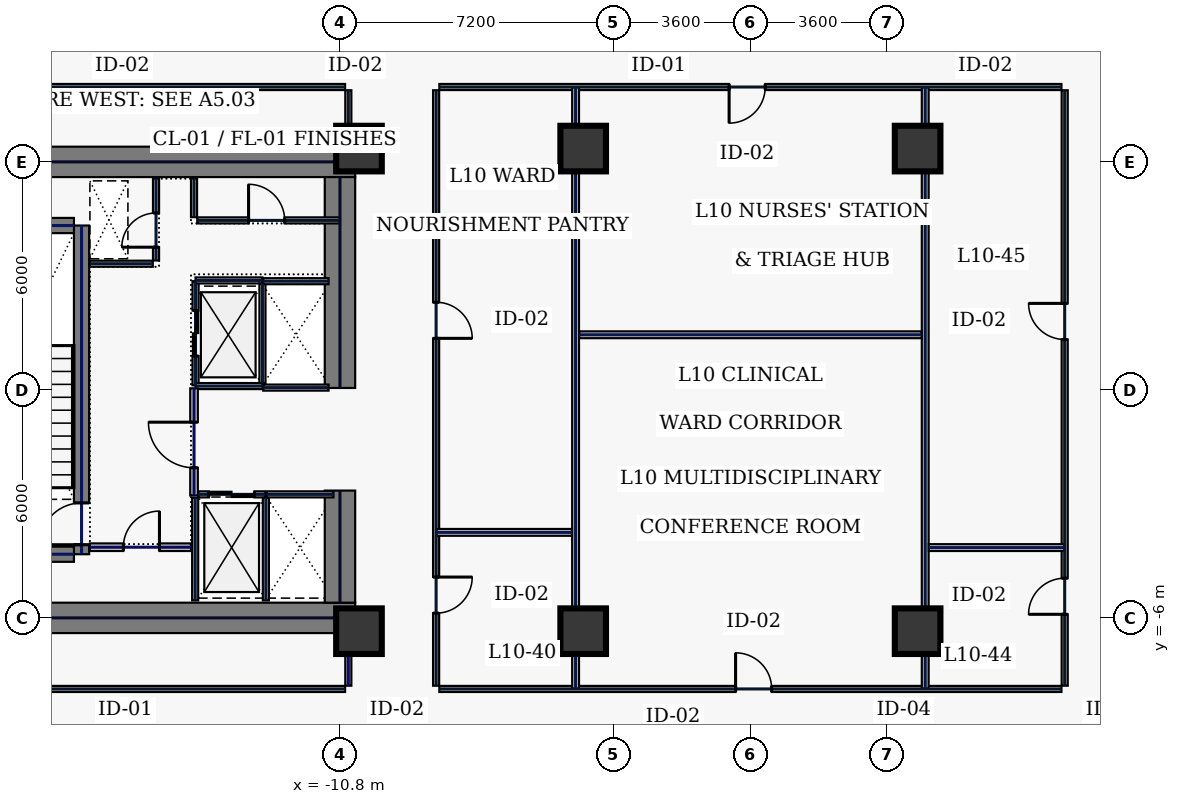
"""IFC4 building model, lengths in metres.
Left out: names, types, materials, properties, quantities, classifications, styles, units other than length and angle.
Written with IfcOpenShell. Run it as: python <this file> out.ifc"""

import sys

from ifc_helpers import new_model, si_unit, direction, frame, frame_2d, origin, origin_2d, place, context, subcontext, project, spatial, rectangle, hollow_rectangle, extrude, element, fill, save


model = new_model("IFC4")
c1 = context("Model", 3, precision=1e-05, world=origin(), true_north=direction((0.0, 1.0)))
c2 = subcontext(c1, "Body", "Model", "MODEL_VIEW")
j1 = project(units=[si_unit("LENGTHUNIT", "METRE"), si_unit("PLANEANGLEUNIT", "RADIAN")], contexts=[c1])
p1 = place(None, origin())
s1 = spatial("IfcSite", under=j1, at=p1, CompositionType="ELEMENT")
p2 = place(p1, origin())
s2 = spatial("IfcBuilding", under=s1, at=p2, CompositionType="ELEMENT")
p3 = place(p2, frame((0.0, 0.0, 51.4)))
s3 = spatial("IfcBuildingStorey", under=s2, at=p3, CompositionType="ELEMENT", Elevation=51.4)
for number, where, z_axis, x_axis in (
    (1, (-22.0, 6.0, 0.0), (0.0, 0.0, 1.0), (1.0, 0.0, 0.0)),
    (2, (-22.0, -6.0, 0.0), (0.0, 0.0, 1.0), (1.0, 0.0, 0.0)),
):
    element("IfcWall", number, at=place(p3, frame(where, z_axis=z_axis, x_axis=x_axis)), inside=s3, PredefinedType="SHEAR", context=c2, shape_type="SweptSolid", body=[
        extrude(rectangle(XDim=11.6, YDim=0.8, at=frame_2d((5.8, 0.0))), origin(), (0.0, 0.0, 1.0), 3.74),
    ])
p4 = place(p3, frame((-10.8, -5.6, 0.0), z_axis=(0.0, 0.0, 1.0), x_axis=(0.0, 1.0, 0.0)))
e3 = element("IfcWall", 3, at=p4, inside=s3, PredefinedType="SHEAR", context=c2, shape_type="SweptSolid", body=[
    extrude(rectangle(XDim=2.95, YDim=0.8, at=frame_2d((1.475, 0.0))), origin(), (0.0, 0.0, 1.0), 3.74),
])
p5 = place(p3, frame((-10.8, 0.05, 0.0), z_axis=(0.0, 0.0, 1.0), x_axis=(0.0, 1.0, 0.0)))
e4 = element("IfcWall", 4, at=p5, inside=s3, PredefinedType="SHEAR", context=c2, shape_type="SweptSolid", body=[
    extrude(rectangle(XDim=5.55, YDim=0.8, at=frame_2d((2.775, 0.0))), origin(), (0.0, 0.0, 1.0), 3.74),
])
p6 = place(p3, frame((-17.6, -4.325, 0.0), z_axis=(0.0, 0.0, 1.0), x_axis=(0.0, 1.0, 0.0)))
e5 = element("IfcWall", 5, at=p6, inside=s3, PredefinedType="SHEAR", context=c2, shape_type="SweptSolid", body=[
    extrude(rectangle(XDim=8.65, YDim=0.4, at=frame_2d((4.325, 0.0))), origin(), (0.0, 0.0, 1.0), 3.74),
])
p7 = place(p6, frame((0.25, 0.0, 0.0)))
e6 = element("IfcOpeningElement", 6, at=p7, cuts=e5, PredefinedType="OPENING", context=c2, shape_type="SweptSolid", body=[
    extrude(rectangle(XDim=1.1, YDim=2.2, at=frame_2d((0.55, 1.1))), frame((0.0, 0.21, 0.0), z_axis=(0.0, -1.0, 0.0), x_axis=(1.0, 0.0, 0.0)), (0.0, 0.0, 1.0), 0.42),
])
for number, where, z_axis, x_axis in (
    (7, (-21.2, -4.325, 0.0), (0.0, 0.0, 1.0), (1.0, 0.0, 0.0)),
    (8, (-21.2, 4.325, 0.0), (0.0, 0.0, 1.0), (1.0, 0.0, 0.0)),
):
    element("IfcWall", number, at=place(p3, frame(where, z_axis=z_axis, x_axis=x_axis)), inside=s3, PredefinedType="SHEAR", context=c2, shape_type="SweptSolid", body=[
        extrude(rectangle(XDim=3.4, YDim=0.4, at=frame_2d((1.7, 0.0))), origin(), (0.0, 0.0, 1.0), 3.74),
    ])
for number, where, z_axis, x_axis in (
    (9, (-10.3, -6.35, 0.0), (0.0, 0.0, 1.0), (1.0, 0.0, 0.0)),
    (10, (-10.3, 6.35, 0.0), (0.0, 0.0, 1.0), (1.0, 0.0, 0.0)),
    (11, (-4.4, -6.35, 0.0), (0.0, 0.0, 1.0), (1.0, 0.0, 0.0)),
    (12, (4.4, -6.35, 0.0), (0.0, 0.0, 1.0), (1.0, 0.0, 0.0)),
    (13, (-4.4, 6.35, 0.0), (0.0, 0.0, 1.0), (1.0, 0.0, 0.0)),
    (14, (4.4, 6.35, 0.0), (0.0, 0.0, 1.0), (1.0, 0.0, 0.0)),
):
    element("IfcColumn", number, at=place(p3, frame(where, z_axis=z_axis, x_axis=x_axis)), inside=s3, PredefinedType="COLUMN", context=c2, shape_type="SweptSolid", body=[
        extrude(hollow_rectangle(XDim=1.2, YDim=1.2, WallThickness=0.05, at=origin_2d()), origin(), (0.0, 0.0, 1.0), 3.74),
    ])
p8 = place(p3, frame((-14.6, 0.12, 0.0), z_axis=(0.0, 0.0, 1.0), x_axis=(0.0, 1.0, 0.0)))
e15 = element("IfcWall", 15, at=p8, inside=s3, PredefinedType="PARTITIONING", context=c2, shape_type="SweptSolid", body=[
    extrude(rectangle(XDim=2.74, YDim=0.16, at=frame_2d((1.37, 0.0))), origin(), (0.0, 0.0, 1.0), 3.74),
])
p9 = place(p8, frame((0.77, 0.0, 0.0)))
e16 = element("IfcOpeningElement", 16, at=p9, cuts=e15, PredefinedType="OPENING", context=c2, shape_type="SweptSolid", body=[
    extrude(rectangle(XDim=1.2, YDim=2.2, at=frame_2d((0.6, 1.1))), frame((0.0, 0.09, 0.0), z_axis=(0.0, -1.0, 0.0), x_axis=(1.0, 0.0, 0.0)), (0.0, 0.0, 1.0), 0.18),
])
for number, where, z_axis, x_axis in (
    (17, (-14.6, 0.1, 0.0), (0.0, 0.0, 1.0), (1.0, 0.0, 0.0)),
    (18, (-14.6, 2.88, 0.0), (0.0, 0.0, 1.0), (1.0, 0.0, 0.0)),
):
    element("IfcWall", number, at=place(p3, frame(where, z_axis=z_axis, x_axis=x_axis)), inside=s3, PredefinedType="PARTITIONING", context=c2, shape_type="SweptSolid", body=[
        extrude(rectangle(XDim=1.76, YDim=0.16, at=frame_2d((0.88, 0.0))), origin(), (0.0, 0.0, 1.0), 3.74),
    ])
p10 = place(p3, frame((-12.84, 0.18, 0.0), z_axis=(0.0, 0.0, 1.0), x_axis=(0.0, 1.0, 0.0)))
e19 = element("IfcWall", 19, at=p10, inside=s3, PredefinedType="PARTITIONING", context=c2, shape_type="SweptSolid", body=[
    extrude(rectangle(XDim=2.62, YDim=0.16, at=frame_2d((1.31, 0.0))), origin(), (0.0, 0.0, 1.0), 3.74),
])
p11 = place(p3, frame((-14.53, -2.75, 0.0), z_axis=(0.0, 0.0, 1.0), x_axis=(1.0, 0.0, 0.0)))
e20 = element("IfcWall", 20, at=p11, inside=s3, PredefinedType="PARTITIONING", context=c2, shape_type="SweptSolid", body=[
    extrude(rectangle(XDim=1.76, YDim=0.16, at=frame_2d((0.88, 0.0))), origin(), (0.0, 0.0, 1.0), 3.74),
])
p12 = place(p11, frame((0.28, 0.0, 0.0)))
e21 = element("IfcOpeningElement", 21, at=p12, cuts=e20, PredefinedType="OPENING", context=c2, shape_type="SweptSolid", body=[
    extrude(rectangle(XDim=1.2, YDim=2.2, at=frame_2d((0.6, 1.1))), frame((0.0, 0.09, 0.0), z_axis=(0.0, -1.0, 0.0), x_axis=(1.0, 0.0, 0.0)), (0.0, 0.0, 1.0), 0.18),
])
for number, where, z_axis, x_axis in (
    (22, (-12.75, -5.54, 0.0), (0.0, 0.0, 1.0), (0.0, 1.0, 0.0)),
    (23, (-14.61, -5.54, 0.0), (0.0, 0.0, 1.0), (0.0, 1.0, 0.0)),
):
    element("IfcWall", number, at=place(p3, frame(where, z_axis=z_axis, x_axis=x_axis)), inside=s3, PredefinedType="PARTITIONING", context=c2, shape_type="SweptSolid", body=[
        extrude(rectangle(XDim=2.7, YDim=0.16, at=frame_2d((1.35, 0.0))), origin(), (0.0, 0.0, 1.0), 3.74),
    ])
p13 = place(p3, frame((-12.73, -2.75, 0.0), z_axis=(0.0, 0.0, 1.0), x_axis=(1.0, 0.0, 0.0)))
e24 = element("IfcWall", 24, at=p13, inside=s3, PredefinedType="PARTITIONING", context=c2, shape_type="SweptSolid", body=[
    extrude(rectangle(XDim=1.76, YDim=0.16, at=frame_2d((0.88, 0.0))), origin(), (0.0, 0.0, 1.0), 3.74),
])
for number, where, z_axis, x_axis in (
    (25, (-12.82, 0.06, 0.0), (0.0, 0.0, 1.0), (1.0, 0.0, 0.0)),
    (26, (-12.82, 2.86, 0.0), (0.0, 0.0, 1.0), (1.0, 0.0, 0.0)),
):
    element("IfcWall", number, at=place(p3, frame(where, z_axis=z_axis, x_axis=x_axis)), inside=s3, PredefinedType="PARTITIONING", context=c2, shape_type="SweptSolid", body=[
        extrude(rectangle(XDim=1.72, YDim=0.16, at=frame_2d((0.86, 0.0))), origin(), (0.0, 0.0, 1.0), 3.74),
    ])
p14 = place(p3, frame((-15.64, 3.405, 0.0), z_axis=(0.0, 0.0, 1.0), x_axis=(0.0, 1.0, 0.0)))
e27 = element("IfcWall", 27, at=p14, inside=s3, PredefinedType="PARTITIONING", context=c2, shape_type="SweptSolid", body=[
    extrude(rectangle(XDim=2.155, YDim=0.16, at=frame_2d((1.078, 0.0))), origin(), (0.0, 0.0, 1.0), 3.74),
])
p15 = place(p14, frame((0.35, 0.0, 0.0)))
e28 = element("IfcOpeningElement", 28, at=p15, cuts=e27, PredefinedType="OPENING", context=c2, shape_type="SweptSolid", body=[
    extrude(rectangle(XDim=0.9, YDim=2.2, at=frame_2d((0.45, 1.1))), frame((0.0, 0.09, 0.0), z_axis=(0.0, -1.0, 0.0), x_axis=(1.0, 0.0, 0.0)), (0.0, 0.0, 1.0), 0.18),
])
p16 = place(p3, frame((-17.38, 3.32, 0.0), z_axis=(0.0, 0.0, 1.0), x_axis=(1.0, 0.0, 0.0)))
e29 = element("IfcWall", 29, at=p16, inside=s3, PredefinedType="PARTITIONING", context=c2, shape_type="SweptSolid", body=[
    extrude(rectangle(XDim=1.655, YDim=0.16, at=frame_2d((0.827, 0.0))), origin(), (0.0, 0.0, 1.0), 3.74),
])
p17 = place(p3, frame((-17.38, -4.14, 0.0), z_axis=(0.0, 0.0, 1.0), x_axis=(1.0, 0.0, 0.0)))
e30 = element("IfcWall", 30, at=p17, inside=s3, PredefinedType="SOLIDWALL", context=c2, shape_type="SweptSolid", body=[
    extrude(rectangle(XDim=2.66, YDim=0.2, at=frame_2d((1.33, 0.0))), origin(), (0.0, 0.0, 1.0), 3.74),
])
p18 = place(p17, frame((0.88, 0.0, 0.0)))
e31 = element("IfcOpeningElement", 31, at=p18, cuts=e30, PredefinedType="OPENING", context=c2, shape_type="SweptSolid", body=[
    extrude(rectangle(XDim=0.95, YDim=2.2, at=frame_2d((0.475, 1.1))), frame((0.0, 0.11, 0.0), z_axis=(0.0, -1.0, 0.0), x_axis=(1.0, 0.0, 0.0)), (0.0, 0.0, 1.0), 0.22),
])
p19 = place(p3, frame((-14.555, 4.46, 0.0), z_axis=(0.0, 0.0, 1.0), x_axis=(1.0, 0.0, 0.0)))
e32 = element("IfcWall", 32, at=p19, inside=s3, PredefinedType="PARTITIONING", context=c2, shape_type="SweptSolid", body=[
    extrude(rectangle(XDim=3.755, YDim=0.16, at=frame_2d((1.877, 0.0))), origin(), (0.0, 0.0, 1.0), 3.74),
])
p20 = place(p19, frame((1.35, 0.0, 0.0)))
e33 = element("IfcOpeningElement", 33, at=p20, cuts=e32, PredefinedType="OPENING", context=c2, shape_type="SweptSolid", body=[
    extrude(rectangle(XDim=0.95, YDim=2.2, at=frame_2d((0.475, 1.1))), frame((0.0, 0.09, 0.0), z_axis=(0.0, -1.0, 0.0), x_axis=(1.0, 0.0, 0.0)), (0.0, 0.0, 1.0), 0.18),
])
p21 = place(p3, frame((-14.64, 4.545, 0.0), z_axis=(0.0, 0.0, 1.0), x_axis=(0.0, 1.0, 0.0)))
e34 = element("IfcWall", 34, at=p21, inside=s3, PredefinedType="PARTITIONING", context=c2, shape_type="SweptSolid", body=[
    extrude(rectangle(XDim=1.015, YDim=0.16, at=frame_2d((0.508, 0.0))), origin(), (0.0, 0.0, 1.0), 3.74),
])
p22 = place(p3, frame((-14.64, -2.78, 0.0), z_axis=(0.0, 0.0, 1.0), x_axis=(0.0, 1.0, 0.0)))
e35 = element("IfcWall", 35, at=p22, inside=s3, PredefinedType="SOLIDWALL", context=c2, shape_type="SweptSolid", body=[
    extrude(rectangle(XDim=2.82, YDim=0.2, at=frame_2d((1.41, 0.0))), origin(), (0.0, 0.0, 1.0), 3.74),
])
p23 = place(p22, frame((0.73, 0.0, 0.0)))
e36 = element("IfcOpeningElement", 36, at=p23, cuts=e35, PredefinedType="OPENING", context=c2, shape_type="SweptSolid", body=[
    extrude(rectangle(XDim=1.2, YDim=2.2, at=frame_2d((0.6, 1.1))), frame((0.0, 0.11, 0.0), z_axis=(0.0, -1.0, 0.0), x_axis=(1.0, 0.0, 0.0)), (0.0, 0.0, 1.0), 0.22),
])
p24 = place(p3, frame((8.27, -7.785, 0.0), z_axis=(0.0, 0.0, 1.0), x_axis=(0.0, 1.0, 0.0)))
e37 = element("IfcWall", 37, at=p24, inside=s3, PredefinedType="PARTITIONING", context=c2, shape_type="SweptSolid", body=[
    extrude(rectangle(XDim=15.67, YDim=0.16, at=frame_2d((7.835, 0.0))), origin(), (0.0, 0.0, 1.0), 3.74),
])
p25 = place(p24, frame((1.879, 0.0, 0.0)))
e38 = element("IfcOpeningElement", 38, at=p25, cuts=e37, PredefinedType="OPENING", context=c2, shape_type="SweptSolid", body=[
    extrude(rectangle(XDim=0.95, YDim=2.2, at=frame_2d((0.475, 1.1))), frame((0.0, 0.09, 0.0), z_axis=(0.0, -1.0, 0.0), x_axis=(1.0, 0.0, 0.0)), (0.0, 0.0, 1.0), 0.18),
])
p26 = place(p24, frame((9.111, 0.0, 0.0)))
e39 = element("IfcOpeningElement", 39, at=p26, cuts=e37, PredefinedType="OPENING", context=c2, shape_type="SweptSolid", body=[
    extrude(rectangle(XDim=0.95, YDim=2.2, at=frame_2d((0.475, 1.1))), frame((0.0, 0.09, 0.0), z_axis=(0.0, -1.0, 0.0), x_axis=(1.0, 0.0, 0.0)), (0.0, 0.0, 1.0), 0.18),
])
p27 = place(p3, frame((8.185, 7.97, 0.0), z_axis=(0.0, 0.0, 1.0), x_axis=(-1.0, 0.0, 0.0)))
e40 = element("IfcWall", 40, at=p27, inside=s3, PredefinedType="PARTITIONING", context=c2, shape_type="SweptSolid", body=[
    extrude(rectangle(XDim=16.37, YDim=0.16, at=frame_2d((8.185, 0.0))), origin(), (0.0, 0.0, 1.0), 3.74),
])
p28 = place(p27, frame((7.795, 0.0, 0.0)))
e41 = element("IfcOpeningElement", 41, at=p28, cuts=e40, PredefinedType="OPENING", context=c2, shape_type="SweptSolid", body=[
    extrude(rectangle(XDim=0.95, YDim=2.2, at=frame_2d((0.475, 1.1))), frame((0.0, 0.09, 0.0), z_axis=(0.0, -1.0, 0.0), x_axis=(1.0, 0.0, 0.0)), (0.0, 0.0, 1.0), 0.18),
])
p29 = place(p3, frame((-8.27, 7.885, 0.0), z_axis=(0.0, 0.0, 1.0), x_axis=(0.0, -1.0, 0.0)))
e42 = element("IfcWall", 42, at=p29, inside=s3, PredefinedType="PARTITIONING", context=c2, shape_type="SweptSolid", body=[
    extrude(rectangle(XDim=15.67, YDim=0.16, at=frame_2d((7.835, 0.0))), origin(), (0.0, 0.0, 1.0), 3.74),
])
p30 = place(p29, frame((12.811, 0.0, 0.0)))
e43 = element("IfcOpeningElement", 43, at=p30, cuts=e42, PredefinedType="OPENING", context=c2, shape_type="SweptSolid", body=[
    extrude(rectangle(XDim=0.95, YDim=2.2, at=frame_2d((0.475, 1.1))), frame((0.0, 0.09, 0.0), z_axis=(0.0, -1.0, 0.0), x_axis=(1.0, 0.0, 0.0)), (0.0, 0.0, 1.0), 0.18),
])
p31 = place(p29, frame((5.579, 0.0, 0.0)))
e44 = element("IfcOpeningElement", 44, at=p31, cuts=e42, PredefinedType="OPENING", context=c2, shape_type="SweptSolid", body=[
    extrude(rectangle(XDim=0.95, YDim=2.2, at=frame_2d((0.475, 1.1))), frame((0.0, 0.09, 0.0), z_axis=(0.0, -1.0, 0.0), x_axis=(1.0, 0.0, 0.0)), (0.0, 0.0, 1.0), 0.18),
])
p32 = place(p3, frame((-8.185, -7.87, 0.0), z_axis=(0.0, 0.0, 1.0), x_axis=(1.0, 0.0, 0.0)))
e45 = element("IfcWall", 45, at=p32, inside=s3, PredefinedType="PARTITIONING", context=c2, shape_type="SweptSolid", body=[
    extrude(rectangle(XDim=16.37, YDim=0.16, at=frame_2d((8.185, 0.0))), origin(), (0.0, 0.0, 1.0), 3.74),
])
p33 = place(p32, frame((7.795, 0.0, 0.0)))
e46 = element("IfcOpeningElement", 46, at=p33, cuts=e45, PredefinedType="OPENING", context=c2, shape_type="SweptSolid", body=[
    extrude(rectangle(XDim=0.95, YDim=2.2, at=frame_2d((0.475, 1.1))), frame((0.0, 0.09, 0.0), z_axis=(0.0, -1.0, 0.0), x_axis=(1.0, 0.0, 0.0)), (0.0, 0.0, 1.0), 0.18),
])
p34 = place(p3, frame((-10.58, -7.785, 0.0), z_axis=(0.0, 0.0, 1.0), x_axis=(0.0, 1.0, 0.0)))
e47 = element("IfcWall", 47, at=p34, inside=s3, PredefinedType="PARTITIONING", context=c2, shape_type="SweptSolid", body=[
    extrude(rectangle(XDim=1.365, YDim=0.16, at=frame_2d((0.683, 0.0))), origin(), (0.0, 0.0, 1.0), 3.285),
])
p35 = place(p3, frame((-10.58, 6.42, 0.0), z_axis=(0.0, 0.0, 1.0), x_axis=(0.0, 1.0, 0.0)))
e48 = element("IfcWall", 48, at=p35, inside=s3, PredefinedType="PARTITIONING", context=c2, shape_type="SweptSolid", body=[
    extrude(rectangle(XDim=1.465, YDim=0.16, at=frame_2d((0.732, 0.0))), origin(), (0.0, 0.0, 1.0), 3.74),
])
for number, where, z_axis, x_axis in (
    (49, (-10.665, 7.97, 0.0), (0.0, 0.0, 1.0), (-1.0, 0.0, 0.0)),
    (50, (-27.185, -7.87, 0.0), (0.0, 0.0, 1.0), (1.0, 0.0, 0.0)),
):
    element("IfcWall", number, at=place(p3, frame(where, z_axis=z_axis, x_axis=x_axis)), inside=s3, PredefinedType="PARTITIONING", context=c2, shape_type="SweptSolid", body=[
        extrude(rectangle(XDim=16.52, YDim=0.16, at=frame_2d((8.26, 0.0))), origin(), (0.0, 0.0, 1.0), 3.74),
    ])
for number, where, z_axis, x_axis in (
    (51, (-4.6, -7.865, 0.0), (0.0, 0.0, 1.0), (0.0, 1.0, 0.0)),
    (52, (4.6, -7.865, 0.0), (0.0, 0.0, 1.0), (0.0, 1.0, 0.0)),
):
    element("IfcWall", number, at=place(p3, frame(where, z_axis=z_axis, x_axis=x_axis)), inside=s3, PredefinedType="PARTITIONING", context=c2, shape_type="SweptSolid", body=[
        extrude(rectangle(XDim=15.83, YDim=0.18, at=frame_2d((7.915, 0.0))), origin(), (0.0, 0.0, 1.0), 2.935),
    ])
p36 = place(p3, frame((-4.505, 1.45, 0.0), z_axis=(0.0, 0.0, 1.0), x_axis=(1.0, 0.0, 0.0)))
e53 = element("IfcWall", 53, at=p36, inside=s3, PredefinedType="PARTITIONING", context=c2, shape_type="SweptSolid", body=[
    extrude(rectangle(XDim=9.01, YDim=0.18, at=frame_2d((4.505, 0.0))), origin(), (0.0, 0.0, 1.0), 3.74),
])
for number, where, z_axis, x_axis in (
    (54, (-8.265, -3.75, 0.0), (0.0, 0.0, 1.0), (1.0, 0.0, 0.0)),
    (55, (4.695, -4.15, 0.0), (0.0, 0.0, 1.0), (1.0, 0.0, 0.0)),
):
    element("IfcWall", number, at=place(p3, frame(where, z_axis=z_axis, x_axis=x_axis)), inside=s3, PredefinedType="PARTITIONING", context=c2, shape_type="SweptSolid", body=[
        extrude(rectangle(XDim=3.57, YDim=0.18, at=frame_2d((1.785, 0.0))), origin(), (0.0, 0.0, 1.0), 3.74),
    ])
p37 = place(p7, origin())
e56 = element("IfcDoor", 56, at=p37, inside=s3, OperationType="SINGLE_SWING_LEFT", PredefinedType="DOOR", context=c2, shape_type="SweptSolid", body=[
    extrude(rectangle(XDim=1.1, YDim=2.2, at=frame_2d((0.55, 1.1))), frame((0.0, 0.025, 0.0), z_axis=(0.0, -1.0, 0.0), x_axis=(1.0, 0.0, 0.0)), (0.0, 0.0, 1.0), 0.05),
])
fill(e6, e56)
p38 = place(p9, origin())
e57 = element("IfcDoor", 57, at=p38, inside=s3, OperationType="SLIDING_TO_LEFT", PredefinedType="DOOR", context=c2, shape_type="SweptSolid", body=[
    extrude(rectangle(XDim=1.2, YDim=2.2, at=frame_2d((0.6, 1.1))), frame((0.0, 0.025, 0.0), z_axis=(0.0, -1.0, 0.0), x_axis=(1.0, 0.0, 0.0)), (0.0, 0.0, 1.0), 0.05),
])
fill(e16, e57)
p39 = place(p12, origin())
e58 = element("IfcDoor", 58, at=p39, inside=s3, OperationType="SLIDING_TO_LEFT", PredefinedType="DOOR", context=c2, shape_type="SweptSolid", body=[
    extrude(rectangle(XDim=1.2, YDim=2.2, at=frame_2d((0.6, 1.1))), frame((0.0, 0.025, 0.0), z_axis=(0.0, -1.0, 0.0), x_axis=(1.0, 0.0, 0.0)), (0.0, 0.0, 1.0), 0.05),
])
fill(e21, e58)
p40 = place(p15, origin())
e59 = element("IfcDoor", 59, at=p40, inside=s3, OperationType="SINGLE_SWING_LEFT", PredefinedType="DOOR", context=c2, shape_type="SweptSolid", body=[
    extrude(rectangle(XDim=0.9, YDim=2.2, at=frame_2d((0.45, 1.1))), frame((0.0, 0.025, 0.0), z_axis=(0.0, -1.0, 0.0), x_axis=(1.0, 0.0, 0.0)), (0.0, 0.0, 1.0), 0.05),
])
fill(e28, e59)
p41 = place(p18, origin())
e60 = element("IfcDoor", 60, at=p41, inside=s3, OperationType="SINGLE_SWING_RIGHT", PredefinedType="DOOR", context=c2, shape_type="SweptSolid", body=[
    extrude(rectangle(XDim=0.95, YDim=2.2, at=frame_2d((0.475, 1.1))), frame((0.0, 0.025, 0.0), z_axis=(0.0, -1.0, 0.0), x_axis=(1.0, 0.0, 0.0)), (0.0, 0.0, 1.0), 0.05),
])
fill(e31, e60)
p42 = place(p20, origin())
e61 = element("IfcDoor", 61, at=p42, inside=s3, OperationType="SINGLE_SWING_LEFT", PredefinedType="DOOR", context=c2, shape_type="SweptSolid", body=[
    extrude(rectangle(XDim=0.95, YDim=2.2, at=frame_2d((0.475, 1.1))), frame((0.0, 0.025, 0.0), z_axis=(0.0, -1.0, 0.0), x_axis=(1.0, 0.0, 0.0)), (0.0, 0.0, 1.0), 0.05),
])
fill(e33, e61)
p43 = place(p23, origin())
e62 = element("IfcDoor", 62, at=p43, inside=s3, OperationType="SINGLE_SWING_RIGHT", PredefinedType="DOOR", context=c2, shape_type="SweptSolid", body=[
    extrude(rectangle(XDim=1.2, YDim=2.2, at=frame_2d((0.6, 1.1))), frame((0.0, 0.025, 0.0), z_axis=(0.0, -1.0, 0.0), x_axis=(1.0, 0.0, 0.0)), (0.0, 0.0, 1.0), 0.05),
])
fill(e36, e62)
p44 = place(p30, origin())
e63 = element("IfcDoor", 63, at=p44, inside=s3, OperationType="SINGLE_SWING_LEFT", PredefinedType="DOOR", context=c2, shape_type="SweptSolid", body=[
    extrude(rectangle(XDim=0.95, YDim=2.2, at=frame_2d((0.475, 1.1))), frame((0.0, 0.025, 0.0), z_axis=(0.0, -1.0, 0.0), x_axis=(1.0, 0.0, 0.0)), (0.0, 0.0, 1.0), 0.05),
])
fill(e43, e63)
p45 = place(p31, origin())
e64 = element("IfcDoor", 64, at=p45, inside=s3, OperationType="SINGLE_SWING_RIGHT", PredefinedType="DOOR", context=c2, shape_type="SweptSolid", body=[
    extrude(rectangle(XDim=0.95, YDim=2.2, at=frame_2d((0.475, 1.1))), frame((0.0, 0.025, 0.0), z_axis=(0.0, -1.0, 0.0), x_axis=(1.0, 0.0, 0.0)), (0.0, 0.0, 1.0), 0.05),
])
fill(e44, e64)
p46 = place(p33, origin())
e65 = element("IfcDoor", 65, at=p46, inside=s3, OperationType="SINGLE_SWING_LEFT", PredefinedType="DOOR", context=c2, shape_type="SweptSolid", body=[
    extrude(rectangle(XDim=0.95, YDim=2.2, at=frame_2d((0.475, 1.1))), frame((0.0, 0.025, 0.0), z_axis=(0.0, -1.0, 0.0), x_axis=(1.0, 0.0, 0.0)), (0.0, 0.0, 1.0), 0.05),
])
fill(e46, e65)
p47 = place(p28, origin())
e66 = element("IfcDoor", 66, at=p47, inside=s3, OperationType="SINGLE_SWING_RIGHT", PredefinedType="DOOR", context=c2, shape_type="SweptSolid", body=[
    extrude(rectangle(XDim=0.95, YDim=2.2, at=frame_2d((0.475, 1.1))), frame((0.0, 0.025, 0.0), z_axis=(0.0, -1.0, 0.0), x_axis=(1.0, 0.0, 0.0)), (0.0, 0.0, 1.0), 0.05),
])
fill(e41, e66)
p48 = place(p25, origin())
e67 = element("IfcDoor", 67, at=p48, inside=s3, OperationType="SINGLE_SWING_LEFT", PredefinedType="DOOR", context=c2, shape_type="SweptSolid", body=[
    extrude(rectangle(XDim=0.95, YDim=2.2, at=frame_2d((0.475, 1.1))), frame((0.0, 0.025, 0.0), z_axis=(0.0, -1.0, 0.0), x_axis=(1.0, 0.0, 0.0)), (0.0, 0.0, 1.0), 0.05),
])
fill(e38, e67)
p49 = place(p26, origin())
e68 = element("IfcDoor", 68, at=p49, inside=s3, OperationType="SINGLE_SWING_RIGHT", PredefinedType="DOOR", context=c2, shape_type="SweptSolid", body=[
    extrude(rectangle(XDim=0.95, YDim=2.2, at=frame_2d((0.475, 1.1))), frame((0.0, 0.025, 0.0), z_axis=(0.0, -1.0, 0.0), x_axis=(1.0, 0.0, 0.0)), (0.0, 0.0, 1.0), 0.05),
])
fill(e39, e68)
save(model, sys.argv[1])
